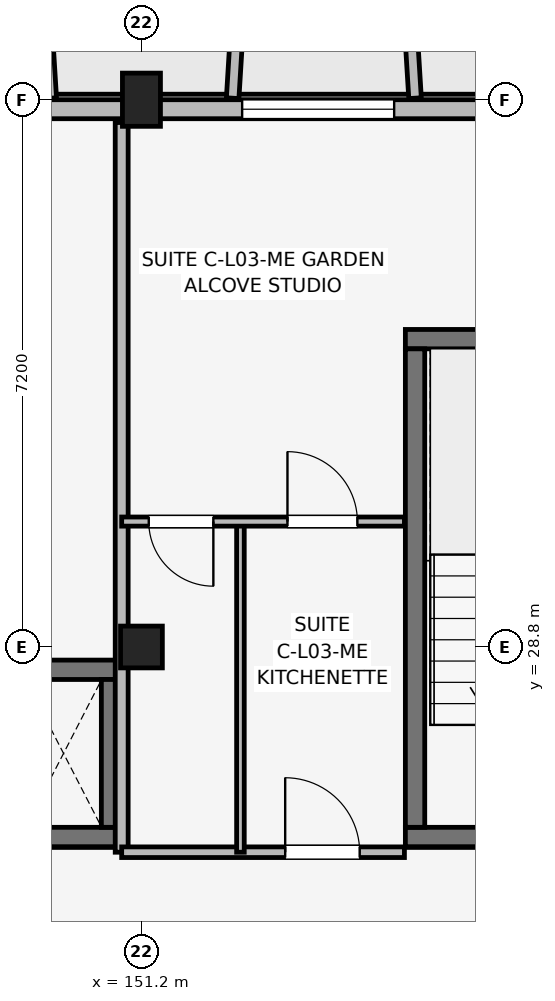
"""IFC4 building model, lengths in metres.
Left out: names, types, materials, properties, quantities, classifications, styles, units other than length and angle.
Written with IfcOpenShell. Run it as: python <this file> out.ifc"""

import sys

from ifc_helpers import new_model, si_unit, direction, frame, frame_2d, origin, origin_2d, place, context, subcontext, project, spatial, rectangle, extrude, element, fill, save


model = new_model("IFC4")
c1 = context("Model", 3, precision=1e-05, world=origin(), true_north=direction((0.0, 1.0)))
c2 = subcontext(c1, "Body", "Model", "MODEL_VIEW")
j1 = project(units=[si_unit("LENGTHUNIT", "METRE"), si_unit("PLANEANGLEUNIT", "RADIAN")], contexts=[c1])
p1 = place(None, origin())
s1 = spatial("IfcSite", under=j1, at=p1, CompositionType="ELEMENT")
p2 = place(p1, origin())
s2 = spatial("IfcBuilding", under=s1, at=p2, CompositionType="ELEMENT")
p3 = place(p2, frame((0.0, 0.0, 11.85)))
s3 = spatial("IfcBuildingStorey", under=s2, at=p3, CompositionType="ELEMENT", Elevation=11.85)
p4 = place(p3, frame((151.2, 28.8, 0.0), z_axis=(0.0, 0.0, 1.0), x_axis=(1.0, 0.0, 0.0)))
e1 = element("IfcColumn", 1, at=p4, inside=s3, PredefinedType="COLUMN", context=c2, shape_type="SweptSolid", body=[
    extrude(rectangle(XDim=0.55, YDim=0.55, at=origin_2d()), origin(), (0.0, 0.0, 1.0), 3.15),
])
p5 = place(p3, frame((151.2, 36.0, 0.0), z_axis=(0.0, 0.0, 1.0), x_axis=(1.0, 0.0, 0.0)))
e2 = element("IfcColumn", 2, at=p5, inside=s3, PredefinedType="COLUMN", context=c2, shape_type="SweptSolid", body=[
    extrude(rectangle(XDim=0.5, YDim=0.7, at=origin_2d()), origin(), (0.0, 0.0, 1.0), 3.15),
])
p6 = place(p3, frame((154.673, 26.3, 0.0), z_axis=(0.0, 0.0, 1.0), x_axis=(1.0, 0.0, 0.0)))
e3 = element("IfcWall", 3, at=p6, inside=s3, PredefinedType="SHEAR", context=c2, shape_type="SweptSolid", body=[
    extrude(rectangle(XDim=3.305, YDim=0.255, at=frame_2d((1.652, 0.0))), origin(), (0.0, 0.0, 1.0), 3.15),
])
p7 = place(p6, frame((1.127, 0.0, 0.0)))
e4 = element("IfcOpeningElement", 4, at=p7, cuts=e3, PredefinedType="OPENING", context=c2, shape_type="SweptSolid", body=[
    extrude(rectangle(XDim=1.05, YDim=2.12, at=frame_2d((0.525, 1.06))), frame((0.0, 0.137, 0.0), z_axis=(0.0, -1.0, 0.0), x_axis=(1.0, 0.0, 0.0)), (0.0, 0.0, 1.0), 0.275),
])
p8 = place(p3, frame((154.673, 32.85, 0.0), z_axis=(0.0, 0.0, 1.0), x_axis=(1.0, 0.0, 0.0)))
e5 = element("IfcWall", 5, at=p8, inside=s3, PredefinedType="SHEAR", context=c2, shape_type="SweptSolid", body=[
    extrude(rectangle(XDim=3.305, YDim=0.255, at=frame_2d((1.652, 0.0))), origin(), (0.0, 0.0, 1.0), 3.15),
])
p9 = place(p3, frame((154.8, 26.427, 0.0), z_axis=(0.0, 0.0, 1.0), x_axis=(0.0, 1.0, 0.0)))
e6 = element("IfcWall", 6, at=p9, inside=s3, PredefinedType="SHEAR", context=c2, shape_type="SweptSolid", body=[
    extrude(rectangle(XDim=6.295, YDim=0.255, at=frame_2d((3.147, 0.0))), origin(), (0.0, 0.0, 1.0), 3.15),
])
for number, where, z_axis, x_axis in (
    (7, (149.123, 26.3, 0.0), (0.0, 0.0, 1.0), (1.0, 0.0, 0.0)),
    (8, (149.123, 28.5, 0.0), (0.0, 0.0, 1.0), (1.0, 0.0, 0.0)),
):
    element("IfcWall", number, at=place(p3, frame(where, z_axis=z_axis, x_axis=x_axis)), inside=s3, PredefinedType="SHEAR", context=c2, shape_type="SweptSolid", body=[
        extrude(rectangle(XDim=1.805, YDim=0.255, at=frame_2d((0.902, 0.0))), origin(), (0.0, 0.0, 1.0), 3.15),
    ])
p10 = place(p3, frame((150.8, 26.427, 0.0), z_axis=(0.0, 0.0, 1.0), x_axis=(0.0, 1.0, 0.0)))
e9 = element("IfcWall", 9, at=p10, inside=s3, PredefinedType="SHEAR", context=c2, shape_type="SweptSolid", body=[
    extrude(rectangle(XDim=1.945, YDim=0.255, at=frame_2d((0.973, 0.0))), origin(), (0.0, 0.0, 1.0), 3.15),
])
p11 = place(p3, frame((162.6, 35.875, 0.0), z_axis=(0.0, 0.0, 1.0), x_axis=(-1.0, 0.0, 0.0)))
e10 = element("IfcWall", 10, at=p11, inside=s3, PredefinedType="SOLIDWALL", context=c2, shape_type="SweptSolid", body=[
    extrude(rectangle(XDim=30.0, YDim=0.25, at=frame_2d((15.0, 0.0))), origin(), (0.0, 0.0, 1.0), 2.43),
])
p12 = place(p11, frame((29.025, 0.0, 0.0), z_axis=(0.0, 0.0, 1.0), x_axis=(-1.0, 0.0, 0.0)))
e11 = element("IfcOpeningElement", 11, at=p12, cuts=e10, PredefinedType="OPENING", context=c2, shape_type="SweptSolid", body=[
    extrude(rectangle(XDim=1.65, YDim=2.15, at=frame_2d((0.825, 1.075))), frame((0.0, 0.135, 0.0), z_axis=(0.0, -1.0, 0.0), x_axis=(1.0, 0.0, 0.0)), (0.0, 0.0, 1.0), 0.27),
])
p13 = place(p11, frame((2.7, 0.0, 0.0), z_axis=(0.0, 0.0, 1.0), x_axis=(-1.0, 0.0, 0.0)))
e12 = element("IfcOpeningElement", 12, at=p13, cuts=e10, PredefinedType="OPENING", context=c2, shape_type="SweptSolid", body=[
    extrude(rectangle(XDim=1.8, YDim=2.15, at=frame_2d((0.9, 1.075))), frame((0.0, 0.135, 0.0), z_axis=(0.0, -1.0, 0.0), x_axis=(1.0, 0.0, 0.0)), (0.0, 0.0, 1.0), 0.27),
])
p14 = place(p11, frame((15.43, 0.0, 0.5)))
e13 = element("IfcOpeningElement", 13, at=p14, cuts=e10, PredefinedType="OPENING", context=c2, shape_type="SweptSolid", body=[
    extrude(rectangle(XDim=0.75, YDim=1.75, at=frame_2d((0.375, 0.875))), frame((0.0, 0.135, 0.0), z_axis=(0.0, -1.0, 0.0), x_axis=(1.0, 0.0, 0.0)), (0.0, 0.0, 1.0), 0.27),
])
p15 = place(p11, frame((8.075, 0.0, 0.67)))
e14 = element("IfcOpeningElement", 14, at=p15, cuts=e10, PredefinedType="OPENING", context=c2, shape_type="SweptSolid", body=[
    extrude(rectangle(XDim=2.0, YDim=1.65, at=frame_2d((1.0, 0.825))), frame((0.0, 0.135, 0.0), z_axis=(0.0, -1.0, 0.0), x_axis=(1.0, 0.0, 0.0)), (0.0, 0.0, 1.0), 0.27),
])
p16 = place(p11, frame((19.97, 0.0, 0.7)))
e15 = element("IfcOpeningElement", 15, at=p16, cuts=e10, PredefinedType="OPENING", context=c2, shape_type="SweptSolid", body=[
    extrude(rectangle(XDim=1.86, YDim=1.6, at=frame_2d((0.93, 0.8))), frame((0.0, 0.135, 0.0), z_axis=(0.0, -1.0, 0.0), x_axis=(1.0, 0.0, 0.0)), (0.0, 0.0, 1.0), 0.27),
])
p17 = place(p3, frame((150.0, 36.02, 0.0), z_axis=(0.0, 0.0, 1.0), x_axis=(-0.061170732449, 0.998127317276, 0.0)))
e16 = element("IfcWall", 16, at=p17, inside=s3, PredefinedType="ELEMENTEDWALL", context=c2, shape_type="SweptSolid", body=[
    extrude(rectangle(XDim=1.964, YDim=0.165, at=frame_2d((0.982, 0.0))), origin(), (0.0, 0.0, 1.0), 2.55),
])
for number, where, z_axis, x_axis in (
    (17, (152.4, 36.02, 0.0), (0.0, 0.0, 1.0), (0.061, 0.998, 0.0)),
    (18, (154.8, 36.02, 0.0), (0.0, 0.0, 1.0), (-0.061, 0.998, 0.0)),
):
    element("IfcWall", number, at=place(p3, frame(where, z_axis=z_axis, x_axis=x_axis)), inside=s3, PredefinedType="ELEMENTEDWALL", context=c2, shape_type="SweptSolid", body=[
        extrude(rectangle(XDim=1.964, YDim=0.165, at=frame_2d((0.982, 0.0))), origin(), (0.0, 0.0, 1.0), 2.58),
    ])
p18 = place(p3, frame((150.94, 26.1, 0.0), z_axis=(0.0, 0.0, 1.0), x_axis=(0.0, 1.0, 0.0)))
e19 = element("IfcWall", 19, at=p18, inside=s3, PredefinedType="PARTITIONING", context=c2, shape_type="SweptSolid", body=[
    extrude(rectangle(XDim=9.6, YDim=0.17, at=frame_2d((4.8, 0.0))), origin(), (0.0, 0.0, 1.0), 2.38),
])
p19 = place(p3, frame((150.94, 26.1, 0.0), z_axis=(0.0, 0.0, 1.0), x_axis=(1.0, 0.0, 0.0)))
e20 = element("IfcWall", 20, at=p19, inside=s3, PredefinedType="PARTITIONING", context=c2, shape_type="SweptSolid", body=[
    extrude(rectangle(XDim=3.72, YDim=0.14, at=frame_2d((1.86, 0.0))), origin(), (0.0, 0.0, 1.0), 2.38),
])
p20 = place(p19, frame((2.151, 0.0, 0.0)))
e21 = element("IfcOpeningElement", 21, at=p20, cuts=e20, PredefinedType="OPENING", context=c2, shape_type="SweptSolid", body=[
    extrude(rectangle(XDim=0.98, YDim=2.1, at=frame_2d((0.49, 1.05))), frame((0.0, 0.08, 0.0), z_axis=(0.0, -1.0, 0.0), x_axis=(1.0, 0.0, 0.0)), (0.0, 0.0, 1.0), 0.16),
])
p21 = place(p3, frame((152.502, 26.1, 0.0), z_axis=(0.0, 0.0, 1.0), x_axis=(0.0, 1.0, 0.0)))
e22 = element("IfcWall", 22, at=p21, inside=s3, PredefinedType="PARTITIONING", context=c2, shape_type="SweptSolid", body=[
    extrude(rectangle(XDim=4.35, YDim=0.1, at=frame_2d((2.175, 0.0))), origin(), (0.0, 0.0, 1.0), 2.375),
])
p22 = place(p3, frame((150.94, 30.45, 0.0), z_axis=(0.0, 0.0, 1.0), x_axis=(1.0, 0.0, 0.0)))
e23 = element("IfcWall", 23, at=p22, inside=s3, PredefinedType="PARTITIONING", context=c2, shape_type="SweptSolid", body=[
    extrude(rectangle(XDim=3.72, YDim=0.12, at=frame_2d((1.86, 0.0))), origin(), (0.0, 0.0, 1.0), 2.38),
])
p23 = place(p22, frame((1.206, 0.0, 0.0), z_axis=(0.0, 0.0, 1.0), x_axis=(-1.0, 0.0, 0.0)))
e24 = element("IfcOpeningElement", 24, at=p23, cuts=e23, PredefinedType="OPENING", context=c2, shape_type="SweptSolid", body=[
    extrude(rectangle(XDim=0.85, YDim=2.08, at=frame_2d((0.425, 1.04))), frame((0.0, 0.07, 0.0), z_axis=(0.0, -1.0, 0.0), x_axis=(1.0, 0.0, 0.0)), (0.0, 0.0, 1.0), 0.14),
])
p24 = place(p22, frame((2.181, 0.0, 0.0)))
e25 = element("IfcOpeningElement", 25, at=p24, cuts=e23, PredefinedType="OPENING", context=c2, shape_type="SweptSolid", body=[
    extrude(rectangle(XDim=0.92, YDim=2.08, at=frame_2d((0.46, 1.04))), frame((0.0, 0.07, 0.0), z_axis=(0.0, -1.0, 0.0), x_axis=(1.0, 0.0, 0.0)), (0.0, 0.0, 1.0), 0.14),
])
p25 = place(p15, origin())
e26 = element("IfcWindow", 26, at=p25, inside=s3, PartitioningType="SINGLE_PANEL", PredefinedType="WINDOW", context=c2, shape_type="SweptSolid", body=[
    extrude(rectangle(XDim=2.0, YDim=1.65, at=frame_2d((1.0, 0.825))), frame((0.0, 0.03, 0.0), z_axis=(0.0, -1.0, 0.0), x_axis=(1.0, 0.0, 0.0)), (0.0, 0.0, 1.0), 0.06),
])
fill(e14, e26)
p26 = place(p20, origin())
e27 = element("IfcDoor", 27, at=p26, inside=s3, OperationType="SINGLE_SWING_LEFT", PredefinedType="DOOR", context=c2, shape_type="SweptSolid", body=[
    extrude(rectangle(XDim=0.98, YDim=2.1, at=frame_2d((0.49, 1.05))), frame((0.0, 0.025, 0.0), z_axis=(0.0, -1.0, 0.0), x_axis=(1.0, 0.0, 0.0)), (0.0, 0.0, 1.0), 0.05),
])
fill(e21, e27)
p27 = place(p23, origin())
e28 = element("IfcDoor", 28, at=p27, inside=s3, OperationType="SINGLE_SWING_RIGHT", PredefinedType="DOOR", context=c2, shape_type="SweptSolid", body=[
    extrude(rectangle(XDim=0.85, YDim=2.08, at=frame_2d((0.425, 1.04))), frame((0.0, 0.025, 0.0), z_axis=(0.0, -1.0, 0.0), x_axis=(1.0, 0.0, 0.0)), (0.0, 0.0, 1.0), 0.05),
])
fill(e24, e28)
p28 = place(p24, origin())
e29 = element("IfcDoor", 29, at=p28, inside=s3, OperationType="SINGLE_SWING_LEFT", PredefinedType="DOOR", context=c2, shape_type="SweptSolid", body=[
    extrude(rectangle(XDim=0.92, YDim=2.08, at=frame_2d((0.46, 1.04))), frame((0.0, 0.025, 0.0), z_axis=(0.0, -1.0, 0.0), x_axis=(1.0, 0.0, 0.0)), (0.0, 0.0, 1.0), 0.05),
])
fill(e25, e29)
save(model, sys.argv[1])
